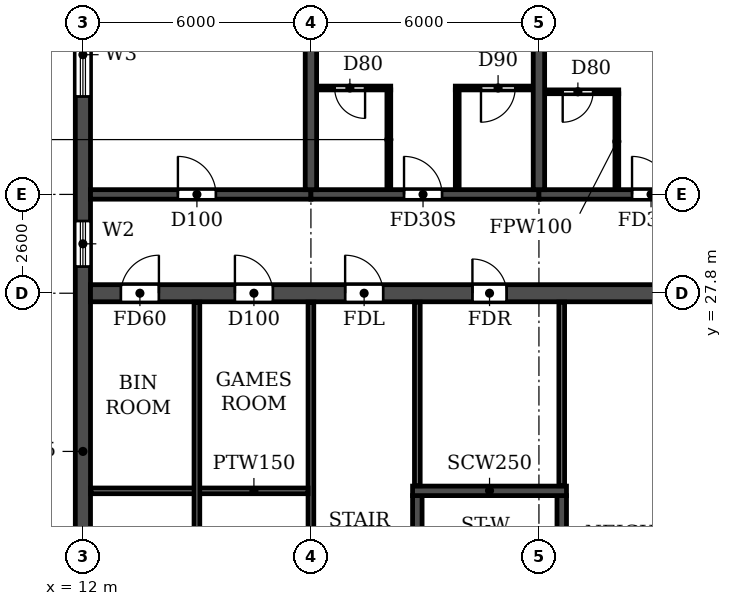
"""IFC4 building model, lengths in metres.
Left out: names, types, materials, properties, quantities, classifications, styles, units other than length and angle.
Written with IfcOpenShell. Run it as: python <this file> out.ifc"""

import sys

from ifc_helpers import new_model, si_unit, direction, frame, frame_2d, origin, place, context, subcontext, project, spatial, rectangle, extrude, element, fill, save


model = new_model("IFC4")
c1 = context("Model", 3, precision=1e-05, world=origin(), true_north=direction((0.0, 1.0)))
c2 = subcontext(c1, "Body", "Model", "MODEL_VIEW")
j1 = project(units=[si_unit("LENGTHUNIT", "METRE"), si_unit("PLANEANGLEUNIT", "RADIAN")], contexts=[c1])
p1 = place(None, origin())
s1 = spatial("IfcSite", under=j1, at=p1, CompositionType="ELEMENT")
p2 = place(p1, origin())
s2 = spatial("IfcBuilding", under=s1, at=p2, CompositionType="ELEMENT")
p3 = place(p2, frame((0.0, 0.0, 122.4)))
s3 = spatial("IfcBuildingStorey", under=s2, at=p3, CompositionType="ELEMENT", Elevation=122.4)
for number, where, z_axis, x_axis in (
    (1, (18.0, 30.525, 0.0), (0.0, 0.0, 1.0), (0.0, 1.0, 0.0)),
    (2, (24.0, 30.525, 0.0), (0.0, 0.0, 1.0), (0.0, 1.0, 0.0)),
):
    element("IfcWall", number, at=place(p3, frame(where, z_axis=z_axis, x_axis=x_axis)), inside=s3, PredefinedType="SHEAR", context=c2, shape_type="SweptSolid", body=[
        extrude(rectangle(XDim=11.675, YDim=0.3, at=frame_2d((5.837, 0.0))), origin(), (0.0, 0.0, 1.0), 3.07),
    ])
p4 = place(p3, frame((12.0, 4.683, 0.0), z_axis=(0.0, 0.0, 1.0), x_axis=(0.0, 1.0, 0.0)))
e3 = element("IfcWall", 3, at=p4, inside=s3, PredefinedType="SHEAR", context=c2, shape_type="SweptSolid", body=[
    extrude(rectangle(XDim=33.034, YDim=0.4, at=frame_2d((16.517, 0.0))), origin(), (0.0, 0.0, 1.0), 3.07),
])
p5 = place(p4, frame((23.817, 0.0, 0.9)))
e4 = element("IfcOpeningElement", 4, at=p5, cuts=e3, PredefinedType="OPENING", context=c2, shape_type="SweptSolid", body=[
    extrude(rectangle(XDim=1.2, YDim=1.5, at=frame_2d((0.6, 0.75))), frame((0.0, 0.21, 0.0), z_axis=(0.0, -1.0, 0.0), x_axis=(1.0, 0.0, 0.0)), (0.0, 0.0, 1.0), 0.42),
])
p6 = place(p4, frame((8.017, 0.0, 0.9)))
e5 = element("IfcOpeningElement", 5, at=p6, cuts=e3, PredefinedType="OPENING", context=c2, shape_type="SweptSolid", body=[
    extrude(rectangle(XDim=1.2, YDim=1.5, at=frame_2d((0.6, 0.75))), frame((0.0, 0.21, 0.0), z_axis=(0.0, -1.0, 0.0), x_axis=(1.0, 0.0, 0.0)), (0.0, 0.0, 1.0), 0.42),
])
p7 = place(p4, frame((28.293, 0.0, 0.6)))
e6 = element("IfcOpeningElement", 6, at=p7, cuts=e3, PredefinedType="OPENING", context=c2, shape_type="SweptSolid", body=[
    extrude(rectangle(XDim=2.2, YDim=1.8, at=frame_2d((1.1, 0.9))), frame((0.0, 0.21, 0.0), z_axis=(0.0, -1.0, 0.0), x_axis=(1.0, 0.0, 0.0)), (0.0, 0.0, 1.0), 0.42),
])
p8 = place(p4, frame((2.541, 0.0, 0.6)))
e7 = element("IfcOpeningElement", 7, at=p8, cuts=e3, PredefinedType="OPENING", context=c2, shape_type="SweptSolid", body=[
    extrude(rectangle(XDim=2.2, YDim=1.8, at=frame_2d((1.1, 0.9))), frame((0.0, 0.21, 0.0), z_axis=(0.0, -1.0, 0.0), x_axis=(1.0, 0.0, 0.0)), (0.0, 0.0, 1.0), 0.42),
])
p9 = place(p4, frame((12.817, 0.0, 0.6)))
e8 = element("IfcOpeningElement", 8, at=p9, cuts=e3, PredefinedType="OPENING", context=c2, shape_type="SweptSolid", body=[
    extrude(rectangle(XDim=2.2, YDim=1.8, at=frame_2d((1.1, 0.9))), frame((0.0, 0.21, 0.0), z_axis=(0.0, -1.0, 0.0), x_axis=(1.0, 0.0, 0.0)), (0.0, 0.0, 1.0), 0.42),
])
p10 = place(p3, frame((12.2, 30.4, 0.0), z_axis=(0.0, 0.0, 1.0), x_axis=(1.0, 0.0, 0.0)))
e9 = element("IfcWall", 9, at=p10, inside=s3, PredefinedType="SHEAR", context=c2, shape_type="SweptSolid", body=[
    extrude(rectangle(XDim=5.8, YDim=0.25, at=frame_2d((2.9, 0.0))), origin(), (0.0, 0.0, 1.0), 2.47),
])
p11 = place(p10, frame((2.3, 0.0, 0.0)))
e10 = element("IfcOpeningElement", 10, at=p11, cuts=e9, PredefinedType="OPENING", context=c2, shape_type="SweptSolid", body=[
    extrude(rectangle(XDim=1.0, YDim=2.1, at=frame_2d((0.5, 1.05))), frame((0.0, 0.135, 0.0), z_axis=(0.0, -1.0, 0.0), x_axis=(1.0, 0.0, 0.0)), (0.0, 0.0, 1.0), 0.27),
])
p12 = place(p3, frame((18.0, 30.4, 0.0), z_axis=(0.0, 0.0, 1.0), x_axis=(1.0, 0.0, 0.0)))
e11 = element("IfcWall", 11, at=p12, inside=s3, PredefinedType="SHEAR", context=c2, shape_type="SweptSolid", body=[
    extrude(rectangle(XDim=6.0, YDim=0.25, at=frame_2d((3.0, 0.0))), origin(), (0.0, 0.0, 1.0), 2.47),
])
p13 = place(p12, frame((2.45, 0.0, 0.0)))
e12 = element("IfcOpeningElement", 12, at=p13, cuts=e11, PredefinedType="OPENING", context=c2, shape_type="SweptSolid", body=[
    extrude(rectangle(XDim=1.0, YDim=2.1, at=frame_2d((0.5, 1.05))), frame((0.0, 0.135, 0.0), z_axis=(0.0, -1.0, 0.0), x_axis=(1.0, 0.0, 0.0)), (0.0, 0.0, 1.0), 0.27),
])
p14 = place(p3, frame((24.0, 30.4, 0.0), z_axis=(0.0, 0.0, 1.0), x_axis=(1.0, 0.0, 0.0)))
e13 = element("IfcWall", 13, at=p14, inside=s3, PredefinedType="SHEAR", context=c2, shape_type="SweptSolid", body=[
    extrude(rectangle(XDim=6.0, YDim=0.25, at=frame_2d((3.0, 0.0))), origin(), (0.0, 0.0, 1.0), 2.47),
])
p15 = place(p14, frame((2.45, 0.0, 0.0)))
e14 = element("IfcOpeningElement", 14, at=p15, cuts=e13, PredefinedType="OPENING", context=c2, shape_type="SweptSolid", body=[
    extrude(rectangle(XDim=1.0, YDim=2.1, at=frame_2d((0.5, 1.05))), frame((0.0, 0.135, 0.0), z_axis=(0.0, -1.0, 0.0), x_axis=(1.0, 0.0, 0.0)), (0.0, 0.0, 1.0), 0.27),
])
p16 = place(p3, frame((12.2, 27.8, 0.0), z_axis=(0.0, 0.0, 1.0), x_axis=(1.0, 0.0, 0.0)))
e15 = element("IfcWall", 15, at=p16, inside=s3, PredefinedType="SOLIDWALL", context=c2, shape_type="SweptSolid", body=[
    extrude(rectangle(XDim=77.6, YDim=0.45, at=frame_2d((38.8, 0.0))), origin(), (0.0, 0.0, 1.0), 3.07),
])
p17 = place(p16, frame((0.8, 0.0, 0.0)))
e16 = element("IfcOpeningElement", 16, at=p17, cuts=e15, PredefinedType="OPENING", context=c2, shape_type="SweptSolid", body=[
    extrude(rectangle(XDim=1.0, YDim=2.1, at=frame_2d((0.5, 1.05))), frame((0.0, 0.235, 0.0), z_axis=(0.0, -1.0, 0.0), x_axis=(1.0, 0.0, 0.0)), (0.0, 0.0, 1.0), 0.47),
])
p18 = place(p16, frame((3.8, 0.0, 0.0)))
e17 = element("IfcOpeningElement", 17, at=p18, cuts=e15, PredefinedType="OPENING", context=c2, shape_type="SweptSolid", body=[
    extrude(rectangle(XDim=1.0, YDim=2.1, at=frame_2d((0.5, 1.05))), frame((0.0, 0.235, 0.0), z_axis=(0.0, -1.0, 0.0), x_axis=(1.0, 0.0, 0.0)), (0.0, 0.0, 1.0), 0.47),
])
p19 = place(p16, frame((6.7, 0.0, 0.0)))
e18 = element("IfcOpeningElement", 18, at=p19, cuts=e15, PredefinedType="OPENING", context=c2, shape_type="SweptSolid", body=[
    extrude(rectangle(XDim=1.0, YDim=2.1, at=frame_2d((0.5, 1.05))), frame((0.0, 0.235, 0.0), z_axis=(0.0, -1.0, 0.0), x_axis=(1.0, 0.0, 0.0)), (0.0, 0.0, 1.0), 0.47),
])
p20 = place(p16, frame((10.05, 0.0, 0.0)))
e19 = element("IfcOpeningElement", 19, at=p20, cuts=e15, PredefinedType="OPENING", context=c2, shape_type="SweptSolid", body=[
    extrude(rectangle(XDim=0.9, YDim=2.1, at=frame_2d((0.45, 1.05))), frame((0.0, 0.235, 0.0), z_axis=(0.0, -1.0, 0.0), x_axis=(1.0, 0.0, 0.0)), (0.0, 0.0, 1.0), 0.47),
])
p21 = place(p16, frame((19.25, 0.0, 0.0)))
e20 = element("IfcOpeningElement", 20, at=p21, cuts=e15, PredefinedType="OPENING", context=c2, shape_type="SweptSolid", body=[
    extrude(rectangle(XDim=0.9, YDim=2.1, at=frame_2d((0.45, 1.05))), frame((0.0, 0.235, 0.0), z_axis=(0.0, -1.0, 0.0), x_axis=(1.0, 0.0, 0.0)), (0.0, 0.0, 1.0), 0.47),
])
p22 = place(p16, frame((25.0, 0.0, 0.0)))
e21 = element("IfcOpeningElement", 21, at=p22, cuts=e15, PredefinedType="OPENING", context=c2, shape_type="SweptSolid", body=[
    extrude(rectangle(XDim=1.0, YDim=2.1, at=frame_2d((0.5, 1.05))), frame((0.0, 0.235, 0.0), z_axis=(0.0, -1.0, 0.0), x_axis=(1.0, 0.0, 0.0)), (0.0, 0.0, 1.0), 0.47),
])
p23 = place(p16, frame((30.2, 0.0, 0.0)))
e22 = element("IfcOpeningElement", 22, at=p23, cuts=e15, PredefinedType="OPENING", context=c2, shape_type="SweptSolid", body=[
    extrude(rectangle(XDim=1.0, YDim=2.1, at=frame_2d((0.5, 1.05))), frame((0.0, 0.235, 0.0), z_axis=(0.0, -1.0, 0.0), x_axis=(1.0, 0.0, 0.0)), (0.0, 0.0, 1.0), 0.47),
])
p24 = place(p16, frame((35.4, 0.0, 0.0)))
e23 = element("IfcOpeningElement", 23, at=p24, cuts=e15, PredefinedType="OPENING", context=c2, shape_type="SweptSolid", body=[
    extrude(rectangle(XDim=1.0, YDim=2.1, at=frame_2d((0.5, 1.05))), frame((0.0, 0.235, 0.0), z_axis=(0.0, -1.0, 0.0), x_axis=(1.0, 0.0, 0.0)), (0.0, 0.0, 1.0), 0.47),
])
p25 = place(p16, frame((38.3, 0.0, 0.0)))
e24 = element("IfcOpeningElement", 24, at=p25, cuts=e15, PredefinedType="OPENING", context=c2, shape_type="SweptSolid", body=[
    extrude(rectangle(XDim=1.0, YDim=2.1, at=frame_2d((0.5, 1.05))), frame((0.0, 0.235, 0.0), z_axis=(0.0, -1.0, 0.0), x_axis=(1.0, 0.0, 0.0)), (0.0, 0.0, 1.0), 0.47),
])
p26 = place(p16, frame((41.2, 0.0, 0.0)))
e25 = element("IfcOpeningElement", 25, at=p26, cuts=e15, PredefinedType="OPENING", context=c2, shape_type="SweptSolid", body=[
    extrude(rectangle(XDim=1.0, YDim=2.1, at=frame_2d((0.5, 1.05))), frame((0.0, 0.235, 0.0), z_axis=(0.0, -1.0, 0.0), x_axis=(1.0, 0.0, 0.0)), (0.0, 0.0, 1.0), 0.47),
])
p27 = place(p16, frame((46.4, 0.0, 0.0)))
e26 = element("IfcOpeningElement", 26, at=p27, cuts=e15, PredefinedType="OPENING", context=c2, shape_type="SweptSolid", body=[
    extrude(rectangle(XDim=1.0, YDim=2.1, at=frame_2d((0.5, 1.05))), frame((0.0, 0.235, 0.0), z_axis=(0.0, -1.0, 0.0), x_axis=(1.0, 0.0, 0.0)), (0.0, 0.0, 1.0), 0.47),
])
p28 = place(p16, frame((51.6, 0.0, 0.0)))
e27 = element("IfcOpeningElement", 27, at=p28, cuts=e15, PredefinedType="OPENING", context=c2, shape_type="SweptSolid", body=[
    extrude(rectangle(XDim=1.0, YDim=2.1, at=frame_2d((0.5, 1.05))), frame((0.0, 0.235, 0.0), z_axis=(0.0, -1.0, 0.0), x_axis=(1.0, 0.0, 0.0)), (0.0, 0.0, 1.0), 0.47),
])
p29 = place(p16, frame((54.2, 0.0, 0.0)))
e28 = element("IfcOpeningElement", 28, at=p29, cuts=e15, PredefinedType="OPENING", context=c2, shape_type="SweptSolid", body=[
    extrude(rectangle(XDim=1.0, YDim=2.1, at=frame_2d((0.5, 1.05))), frame((0.0, 0.235, 0.0), z_axis=(0.0, -1.0, 0.0), x_axis=(1.0, 0.0, 0.0)), (0.0, 0.0, 1.0), 0.47),
])
p30 = place(p16, frame((57.45, 0.0, 0.0)))
e29 = element("IfcOpeningElement", 29, at=p30, cuts=e15, PredefinedType="OPENING", context=c2, shape_type="SweptSolid", body=[
    extrude(rectangle(XDim=0.9, YDim=2.1, at=frame_2d((0.45, 1.05))), frame((0.0, 0.235, 0.0), z_axis=(0.0, -1.0, 0.0), x_axis=(1.0, 0.0, 0.0)), (0.0, 0.0, 1.0), 0.47),
])
p31 = place(p16, frame((66.65, 0.0, 0.0)))
e30 = element("IfcOpeningElement", 30, at=p31, cuts=e15, PredefinedType="OPENING", context=c2, shape_type="SweptSolid", body=[
    extrude(rectangle(XDim=0.9, YDim=2.1, at=frame_2d((0.45, 1.05))), frame((0.0, 0.235, 0.0), z_axis=(0.0, -1.0, 0.0), x_axis=(1.0, 0.0, 0.0)), (0.0, 0.0, 1.0), 0.47),
])
p32 = place(p16, frame((69.9, 0.0, 0.0)))
e31 = element("IfcOpeningElement", 31, at=p32, cuts=e15, PredefinedType="OPENING", context=c2, shape_type="SweptSolid", body=[
    extrude(rectangle(XDim=1.0, YDim=2.1, at=frame_2d((0.5, 1.05))), frame((0.0, 0.235, 0.0), z_axis=(0.0, -1.0, 0.0), x_axis=(1.0, 0.0, 0.0)), (0.0, 0.0, 1.0), 0.47),
])
p33 = place(p16, frame((72.8, 0.0, 0.0)))
e32 = element("IfcOpeningElement", 32, at=p33, cuts=e15, PredefinedType="OPENING", context=c2, shape_type="SweptSolid", body=[
    extrude(rectangle(XDim=1.0, YDim=2.1, at=frame_2d((0.5, 1.05))), frame((0.0, 0.235, 0.0), z_axis=(0.0, -1.0, 0.0), x_axis=(1.0, 0.0, 0.0)), (0.0, 0.0, 1.0), 0.47),
])
p34 = place(p16, frame((75.8, 0.0, 0.0)))
e33 = element("IfcOpeningElement", 33, at=p34, cuts=e15, PredefinedType="OPENING", context=c2, shape_type="SweptSolid", body=[
    extrude(rectangle(XDim=1.0, YDim=2.1, at=frame_2d((0.5, 1.05))), frame((0.0, 0.235, 0.0), z_axis=(0.0, -1.0, 0.0), x_axis=(1.0, 0.0, 0.0)), (0.0, 0.0, 1.0), 0.47),
])
p35 = place(p3, frame((20.8, 14.825, 0.0), z_axis=(0.0, 0.0, 1.0), x_axis=(0.0, 1.0, 0.0)))
e34 = element("IfcWall", 34, at=p35, inside=s3, PredefinedType="SOLIDWALL", context=c2, shape_type="SweptSolid", body=[
    extrude(rectangle(XDim=7.65, YDim=0.25, at=frame_2d((3.825, 0.0))), origin(), (0.0, 0.0, 1.0), 3.07),
])
p36 = place(p35, frame((0.475, 0.0, 0.0)))
e35 = element("IfcOpeningElement", 35, at=p36, cuts=e34, PredefinedType="OPENING", context=c2, shape_type="SweptSolid", body=[
    extrude(rectangle(XDim=1.0, YDim=2.1, at=frame_2d((0.5, 1.05))), frame((0.0, 0.135, 0.0), z_axis=(0.0, -1.0, 0.0), x_axis=(1.0, 0.0, 0.0)), (0.0, 0.0, 1.0), 0.27),
])
p37 = place(p3, frame((24.6, 14.825, 0.0), z_axis=(0.0, 0.0, 1.0), x_axis=(0.0, 1.0, 0.0)))
e36 = element("IfcWall", 36, at=p37, inside=s3, PredefinedType="SOLIDWALL", context=c2, shape_type="SweptSolid", body=[
    extrude(rectangle(XDim=7.65, YDim=0.25, at=frame_2d((3.825, 0.0))), origin(), (0.0, 0.0, 1.0), 3.07),
])
p38 = place(p3, frame((20.675, 22.6, 0.0), z_axis=(0.0, 0.0, 1.0), x_axis=(1.0, 0.0, 0.0)))
e37 = element("IfcWall", 37, at=p38, inside=s3, PredefinedType="SOLIDWALL", context=c2, shape_type="SweptSolid", body=[
    extrude(rectangle(XDim=4.05, YDim=0.25, at=frame_2d((2.025, 0.0))), origin(), (0.0, 0.0, 1.0), 3.07),
])
p39 = place(p3, frame((18.0, 14.835, 0.0), z_axis=(0.0, 0.0, 1.0), x_axis=(0.0, 1.0, 0.0)))
e38 = element("IfcWall", 38, at=p39, inside=s3, PredefinedType="PARTITIONING", context=c2, shape_type="SweptSolid", body=[
    extrude(rectangle(XDim=12.73, YDim=0.15, at=frame_2d((6.365, 0.0))), origin(), (0.0, 0.0, 1.0), 3.07),
])
p40 = place(p3, frame((24.16, 33.1, 0.0), z_axis=(0.0, 0.0, 1.0), x_axis=(1.0, 0.0, 0.0)))
e39 = element("IfcWall", 39, at=p40, inside=s3, PredefinedType="PARTITIONING", context=c2, shape_type="SweptSolid", body=[
    extrude(rectangle(XDim=1.94, YDim=0.1, at=frame_2d((0.97, 0.0))), origin(), (0.0, 0.0, 1.0), 3.07),
])
p41 = place(p40, frame((0.465, 0.0, 0.0)))
e40 = element("IfcOpeningElement", 40, at=p41, cuts=e39, PredefinedType="OPENING", context=c2, shape_type="SweptSolid", body=[
    extrude(rectangle(XDim=0.8, YDim=2.1, at=frame_2d((0.4, 1.05))), frame((0.0, 0.06, 0.0), z_axis=(0.0, -1.0, 0.0), x_axis=(1.0, 0.0, 0.0)), (0.0, 0.0, 1.0), 0.12),
])
p42 = place(p3, frame((18.16, 33.2, 0.0), z_axis=(0.0, 0.0, 1.0), x_axis=(1.0, 0.0, 0.0)))
e41 = element("IfcWall", 41, at=p42, inside=s3, PredefinedType="PARTITIONING", context=c2, shape_type="SweptSolid", body=[
    extrude(rectangle(XDim=1.94, YDim=0.1, at=frame_2d((0.97, 0.0))), origin(), (0.0, 0.0, 1.0), 3.07),
])
p43 = place(p42, frame((0.465, 0.0, 0.0)))
e42 = element("IfcOpeningElement", 42, at=p43, cuts=e41, PredefinedType="OPENING", context=c2, shape_type="SweptSolid", body=[
    extrude(rectangle(XDim=0.8, YDim=2.1, at=frame_2d((0.4, 1.05))), frame((0.0, 0.06, 0.0), z_axis=(0.0, -1.0, 0.0), x_axis=(1.0, 0.0, 0.0)), (0.0, 0.0, 1.0), 0.12),
])
p44 = place(p3, frame((21.8, 33.2, 0.0), z_axis=(0.0, 0.0, 1.0), x_axis=(1.0, 0.0, 0.0)))
e43 = element("IfcWall", 43, at=p44, inside=s3, PredefinedType="PARTITIONING", context=c2, shape_type="SweptSolid", body=[
    extrude(rectangle(XDim=2.04, YDim=0.1, at=frame_2d((1.02, 0.0))), origin(), (0.0, 0.0, 1.0), 3.07),
])
p45 = place(p44, frame((0.675, 0.0, 0.0)))
e44 = element("IfcOpeningElement", 44, at=p45, cuts=e43, PredefinedType="OPENING", context=c2, shape_type="SweptSolid", body=[
    extrude(rectangle(XDim=0.9, YDim=2.1, at=frame_2d((0.45, 1.05))), frame((0.0, 0.06, 0.0), z_axis=(0.0, -1.0, 0.0), x_axis=(1.0, 0.0, 0.0)), (0.0, 0.0, 1.0), 0.12),
])
for number, where, z_axis, x_axis in (
    (45, (20.05, 30.535, 0.0), (0.0, 0.0, 1.0), (0.0, 1.0, 0.0)),
    (46, (21.85, 30.535, 0.0), (0.0, 0.0, 1.0), (0.0, 1.0, 0.0)),
):
    element("IfcWall", number, at=place(p3, frame(where, z_axis=z_axis, x_axis=x_axis)), inside=s3, PredefinedType="PARTITIONING", context=c2, shape_type="SweptSolid", body=[
        extrude(rectangle(XDim=2.615, YDim=0.1, at=frame_2d((1.308, 0.0))), origin(), (0.0, 0.0, 1.0), 3.07),
    ])
p46 = place(p3, frame((26.05, 30.535, 0.0), z_axis=(0.0, 0.0, 1.0), x_axis=(0.0, 1.0, 0.0)))
e47 = element("IfcWall", 47, at=p46, inside=s3, PredefinedType="PARTITIONING", context=c2, shape_type="SweptSolid", body=[
    extrude(rectangle(XDim=2.515, YDim=0.1, at=frame_2d((1.258, 0.0))), origin(), (0.0, 0.0, 1.0), 3.07),
])
p47 = place(p3, frame((12.21, 22.6, 0.0), z_axis=(0.0, 0.0, 1.0), x_axis=(1.0, 0.0, 0.0)))
e48 = element("IfcWall", 48, at=p47, inside=s3, PredefinedType="PARTITIONING", context=c2, shape_type="SweptSolid", body=[
    extrude(rectangle(XDim=5.715, YDim=0.15, at=frame_2d((2.857, 0.0))), origin(), (0.0, 0.0, 1.0), 3.07),
])
p48 = place(p3, frame((15.0, 14.835, 0.0), z_axis=(0.0, 0.0, 1.0), x_axis=(0.0, 1.0, 0.0)))
e49 = element("IfcWall", 49, at=p48, inside=s3, PredefinedType="PARTITIONING", context=c2, shape_type="SweptSolid", body=[
    extrude(rectangle(XDim=12.73, YDim=0.15, at=frame_2d((6.365, 0.0))), origin(), (0.0, 0.0, 1.0), 3.07),
])
for number, where, z_axis, x_axis in (
    (50, (20.8, 22.735, 0.0), (0.0, 0.0, 1.0), (0.0, 1.0, 0.0)),
    (51, (24.6, 22.735, 0.0), (0.0, 0.0, 1.0), (0.0, 1.0, 0.0)),
):
    element("IfcWall", number, at=place(p3, frame(where, z_axis=z_axis, x_axis=x_axis)), inside=s3, PredefinedType="PARTITIONING", context=c2, shape_type="SweptSolid", body=[
        extrude(rectangle(XDim=4.83, YDim=0.15, at=frame_2d((2.415, 0.0))), origin(), (0.0, 0.0, 1.0), 3.07),
    ])
p49 = place(p5, origin())
e52 = element("IfcWindow", 52, at=p49, inside=s3, PartitioningType="SINGLE_PANEL", PredefinedType="WINDOW", context=c2, shape_type="SweptSolid", body=[
    extrude(rectangle(XDim=1.2, YDim=1.5, at=frame_2d((0.6, 0.75))), frame((0.0, 0.03, 0.0), z_axis=(0.0, -1.0, 0.0), x_axis=(1.0, 0.0, 0.0)), (0.0, 0.0, 1.0), 0.06),
])
fill(e4, e52)
p50 = place(p7, origin())
e53 = element("IfcWindow", 53, at=p50, inside=s3, PartitioningType="DOUBLE_PANEL_HORIZONTAL", PredefinedType="WINDOW", context=c2, shape_type="SweptSolid", body=[
    extrude(rectangle(XDim=2.2, YDim=1.8, at=frame_2d((1.1, 0.9))), frame((0.0, 0.03, 0.0), z_axis=(0.0, -1.0, 0.0), x_axis=(1.0, 0.0, 0.0)), (0.0, 0.0, 1.0), 0.06),
])
fill(e6, e53)
p51 = place(p17, origin())
e54 = element("IfcDoor", 54, at=p51, inside=s3, OperationType="SINGLE_SWING_RIGHT", PredefinedType="DOOR", context=c2, shape_type="SweptSolid", body=[
    extrude(rectangle(XDim=1.0, YDim=2.1, at=frame_2d((0.5, 1.05))), frame((0.0, 0.025, 0.0), z_axis=(0.0, -1.0, 0.0), x_axis=(1.0, 0.0, 0.0)), (0.0, 0.0, 1.0), 0.05),
])
fill(e16, e54)
p52 = place(p18, origin())
e55 = element("IfcDoor", 55, at=p52, inside=s3, OperationType="SINGLE_SWING_LEFT", PredefinedType="DOOR", context=c2, shape_type="SweptSolid", body=[
    extrude(rectangle(XDim=1.0, YDim=2.1, at=frame_2d((0.5, 1.05))), frame((0.0, 0.025, 0.0), z_axis=(0.0, -1.0, 0.0), x_axis=(1.0, 0.0, 0.0)), (0.0, 0.0, 1.0), 0.05),
])
fill(e17, e55)
p53 = place(p19, origin())
e56 = element("IfcDoor", 56, at=p53, inside=s3, OperationType="SINGLE_SWING_LEFT", PredefinedType="DOOR", context=c2, shape_type="SweptSolid", body=[
    extrude(rectangle(XDim=1.0, YDim=2.1, at=frame_2d((0.5, 1.05))), frame((0.0, 0.025, 0.0), z_axis=(0.0, -1.0, 0.0), x_axis=(1.0, 0.0, 0.0)), (0.0, 0.0, 1.0), 0.05),
])
fill(e18, e56)
p54 = place(p20, origin())
e57 = element("IfcDoor", 57, at=p54, inside=s3, OperationType="SINGLE_SWING_LEFT", PredefinedType="DOOR", context=c2, shape_type="SweptSolid", body=[
    extrude(rectangle(XDim=0.9, YDim=2.1, at=frame_2d((0.45, 1.05))), frame((0.0, 0.025, 0.0), z_axis=(0.0, -1.0, 0.0), x_axis=(1.0, 0.0, 0.0)), (0.0, 0.0, 1.0), 0.05),
])
fill(e19, e57)
p55 = place(p11, origin())
e58 = element("IfcDoor", 58, at=p55, inside=s3, OperationType="SINGLE_SWING_LEFT", PredefinedType="DOOR", context=c2, shape_type="SweptSolid", body=[
    extrude(rectangle(XDim=1.0, YDim=2.1, at=frame_2d((0.5, 1.05))), frame((0.0, 0.025, 0.0), z_axis=(0.0, -1.0, 0.0), x_axis=(1.0, 0.0, 0.0)), (0.0, 0.0, 1.0), 0.05),
])
fill(e10, e58)
p56 = place(p43, frame((0.8, 0.0, 0.0), z_axis=(0.0, 0.0, 1.0), x_axis=(-1.0, 0.0, 0.0)))
e59 = element("IfcDoor", 59, at=p56, inside=s3, OperationType="SINGLE_SWING_LEFT", PredefinedType="DOOR", context=c2, shape_type="SweptSolid", body=[
    extrude(rectangle(XDim=0.8, YDim=2.1, at=frame_2d((0.4, 1.05))), frame((0.0, 0.025, 0.0), z_axis=(0.0, -1.0, 0.0), x_axis=(1.0, 0.0, 0.0)), (0.0, 0.0, 1.0), 0.05),
])
fill(e42, e59)
p57 = place(p13, origin())
e60 = element("IfcDoor", 60, at=p57, inside=s3, OperationType="SINGLE_SWING_LEFT", PredefinedType="DOOR", context=c2, shape_type="SweptSolid", body=[
    extrude(rectangle(XDim=1.0, YDim=2.1, at=frame_2d((0.5, 1.05))), frame((0.0, 0.025, 0.0), z_axis=(0.0, -1.0, 0.0), x_axis=(1.0, 0.0, 0.0)), (0.0, 0.0, 1.0), 0.05),
])
fill(e12, e60)
p58 = place(p45, frame((0.9, 0.0, 0.0), z_axis=(0.0, 0.0, 1.0), x_axis=(-1.0, 0.0, 0.0)))
e61 = element("IfcDoor", 61, at=p58, inside=s3, OperationType="SINGLE_SWING_RIGHT", PredefinedType="DOOR", context=c2, shape_type="SweptSolid", body=[
    extrude(rectangle(XDim=0.9, YDim=2.1, at=frame_2d((0.45, 1.05))), frame((0.0, 0.025, 0.0), z_axis=(0.0, -1.0, 0.0), x_axis=(1.0, 0.0, 0.0)), (0.0, 0.0, 1.0), 0.05),
])
fill(e44, e61)
p59 = place(p41, frame((0.8, 0.0, 0.0), z_axis=(0.0, 0.0, 1.0), x_axis=(-1.0, 0.0, 0.0)))
e62 = element("IfcDoor", 62, at=p59, inside=s3, OperationType="SINGLE_SWING_RIGHT", PredefinedType="DOOR", context=c2, shape_type="SweptSolid", body=[
    extrude(rectangle(XDim=0.8, YDim=2.1, at=frame_2d((0.4, 1.05))), frame((0.0, 0.025, 0.0), z_axis=(0.0, -1.0, 0.0), x_axis=(1.0, 0.0, 0.0)), (0.0, 0.0, 1.0), 0.05),
])
fill(e40, e62)
p60 = place(p15, origin())
e63 = element("IfcDoor", 63, at=p60, inside=s3, OperationType="SINGLE_SWING_LEFT", PredefinedType="DOOR", context=c2, shape_type="SweptSolid", body=[
    extrude(rectangle(XDim=1.0, YDim=2.1, at=frame_2d((0.5, 1.05))), frame((0.0, 0.025, 0.0), z_axis=(0.0, -1.0, 0.0), x_axis=(1.0, 0.0, 0.0)), (0.0, 0.0, 1.0), 0.05),
])
fill(e14, e63)
save(model, sys.argv[1])
